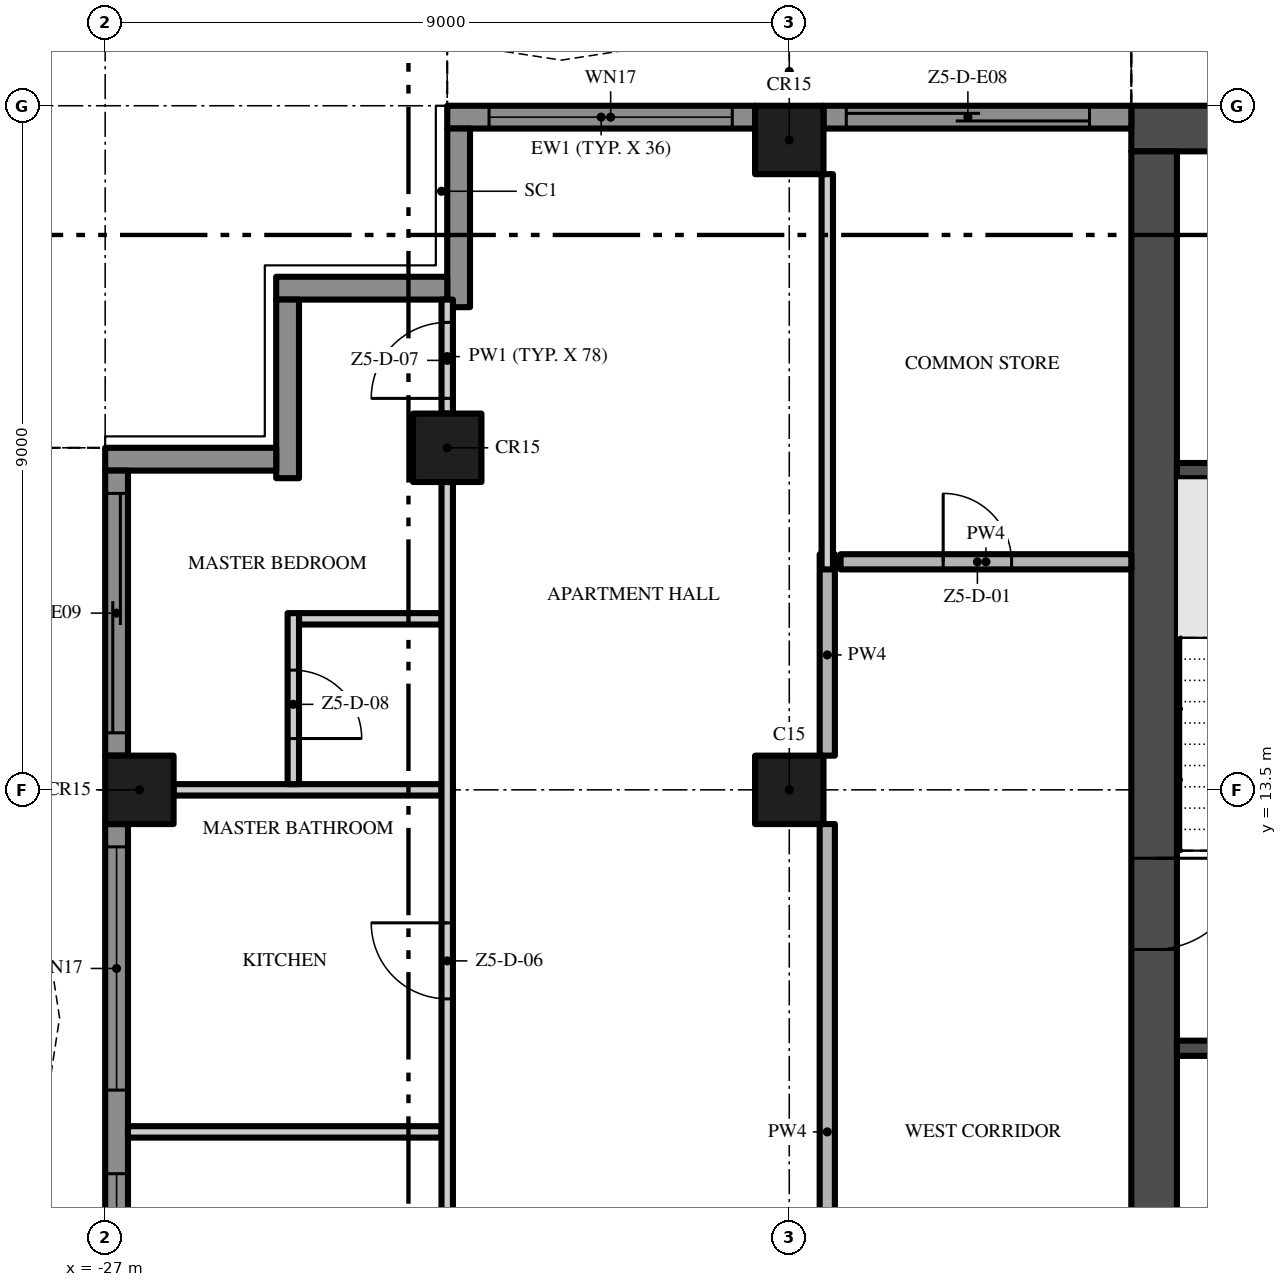
"""IFC4 building model, lengths in metres.
Left out: names, types, materials, properties, quantities, classifications, styles, units other than length and angle.
Written with IfcOpenShell. Run it as: python <this file> out.ifc"""

import sys

from ifc_helpers import new_model, si_unit, direction, frame, frame_2d, origin, origin_2d, place, context, subcontext, project, spatial, polyline, rectangle, outline, extrude, element, fill, save


model = new_model("IFC4")
c1 = context("Model", 3, precision=1e-05, world=origin(), true_north=direction((0.0, 1.0)))
c2 = subcontext(c1, "Body", "Model", "MODEL_VIEW")
j1 = project(units=[si_unit("LENGTHUNIT", "METRE"), si_unit("PLANEANGLEUNIT", "RADIAN")], contexts=[c1])
p1 = place(None, origin())
s1 = spatial("IfcSite", under=j1, at=p1, CompositionType="ELEMENT")
p2 = place(p1, origin())
s2 = spatial("IfcBuilding", under=s1, at=p2, CompositionType="ELEMENT")
p3 = place(p2, frame((0.0, 0.0, 280.6)))
s3 = spatial("IfcBuildingStorey", under=s2, at=p3, CompositionType="ELEMENT", Elevation=280.6)
p4 = place(p3, frame((13.5, 22.2, -0.3), z_axis=(0.0, 0.0, 1.0), x_axis=(-1.0, 0.0, 0.0)))
e1 = element("IfcWall", 1, at=p4, inside=s3, PredefinedType="SHEAR", context=c2, shape_type="SweptSolid", body=[
    extrude(rectangle(XDim=27.0, YDim=0.6, at=frame_2d((13.5, 0.0))), origin(), (0.0, 0.0, 1.0), 3.8),
])
p5 = place(p3, frame((-13.2, 21.9, -0.3), z_axis=(0.0, 0.0, 1.0), x_axis=(0.0, -1.0, 0.0)))
e2 = element("IfcWall", 2, at=p5, inside=s3, PredefinedType="SHEAR", context=c2, shape_type="SweptSolid", body=[
    extrude(rectangle(XDim=16.8, YDim=0.6, at=frame_2d((8.4, 0.0))), origin(), (0.0, 0.0, 1.0), 3.8),
])
p6 = place(p5, frame((9.3, 0.0, 0.3)))
e3 = element("IfcOpeningElement", 3, at=p6, cuts=e2, PredefinedType="OPENING", context=c2, shape_type="SweptSolid", body=[
    extrude(rectangle(XDim=1.2, YDim=2.2, at=frame_2d((0.6, 1.1))), frame((0.0, 0.31, 0.0), z_axis=(0.0, -1.0, 0.0), x_axis=(1.0, 0.0, 0.0)), (0.0, 0.0, 1.0), 0.62),
])
for number, where, z_axis, x_axis in (
    (4, (-18.0, 13.5, 0.0), (0.0, 0.0, 1.0), (1.0, 0.0, 0.0)),
    (5, (-18.0, 22.05, 0.0), (0.0, 0.0, 1.0), (1.0, 0.0, 0.0)),
    (6, (-26.55, 13.5, 0.0), (0.0, 0.0, 1.0), (1.0, 0.0, 0.0)),
    (7, (-22.5, 18.0, 0.0), (0.0, 0.0, 1.0), (1.0, 0.0, 0.0)),
):
    element("IfcColumn", number, at=place(p3, frame(where, z_axis=z_axis, x_axis=x_axis)), inside=s3, PredefinedType="COLUMN", context=c2, shape_type="SweptSolid", body=[
        extrude(rectangle(XDim=0.9, YDim=0.9, at=origin_2d()), origin(), (0.0, 0.0, 1.0), 3.5),
    ])
p7 = place(p3, frame((-17.55, 22.35, 0.0), z_axis=(0.0, 0.0, 1.0), x_axis=(1.0, 0.0, 0.0)))
e8 = element("IfcWall", 8, at=p7, inside=s3, PredefinedType="SOLIDWALL", context=c2, shape_type="SweptSolid", body=[
    extrude(rectangle(XDim=4.05, YDim=0.3, at=frame_2d((2.025, 0.0))), origin(), (0.0, 0.0, 1.0), 3.5),
])
p8 = place(p7, frame((0.3, 0.0, 0.0)))
e9 = element("IfcOpeningElement", 9, at=p8, cuts=e8, PredefinedType="OPENING", context=c2, shape_type="SweptSolid", body=[
    extrude(rectangle(XDim=3.2, YDim=2.4, at=frame_2d((1.6, 1.2))), frame((0.0, 0.16, 0.0), z_axis=(0.0, -1.0, 0.0), x_axis=(1.0, 0.0, 0.0)), (0.0, 0.0, 1.0), 0.32),
])
p9 = place(p3, frame((-22.5, 22.35, 0.0), z_axis=(0.0, 0.0, 1.0), x_axis=(1.0, 0.0, 0.0)))
e10 = element("IfcWall", 10, at=p9, inside=s3, PredefinedType="SOLIDWALL", context=c2, shape_type="SweptSolid", body=[
    extrude(rectangle(XDim=4.05, YDim=0.3, at=frame_2d((2.025, 0.0))), origin(), (0.0, 0.0, 1.0), 3.5),
])
p10 = place(p9, frame((0.55, 0.0, 0.45)))
e11 = element("IfcOpeningElement", 11, at=p10, cuts=e10, PredefinedType="OPENING", context=c2, shape_type="SweptSolid", body=[
    extrude(rectangle(XDim=3.2, YDim=2.65, at=frame_2d((1.6, 1.325))), frame((0.0, 0.16, 0.0), z_axis=(0.0, -1.0, 0.0), x_axis=(1.0, 0.0, 0.0)), (0.0, 0.0, 1.0), 0.32),
])
p11 = place(p3, frame((-22.35, 19.85, 0.0), z_axis=(0.0, 0.0, 1.0), x_axis=(0.0, 1.0, 0.0)))
e12 = element("IfcWall", 12, at=p11, inside=s3, PredefinedType="SOLIDWALL", context=c2, shape_type="SweptSolid", body=[
    extrude(rectangle(XDim=2.35, YDim=0.3, at=frame_2d((1.175, 0.0))), origin(), (0.0, 0.0, 1.0), 3.5),
])
p12 = place(p3, frame((-24.75, 20.1, 0.0), z_axis=(0.0, 0.0, 1.0), x_axis=(1.0, 0.0, 0.0)))
e13 = element("IfcWall", 13, at=p12, inside=s3, PredefinedType="SOLIDWALL", context=c2, shape_type="SweptSolid", body=[
    extrude(rectangle(XDim=2.25, YDim=0.3, at=frame_2d((1.125, 0.0))), origin(), (0.0, 0.0, 1.0), 3.5),
])
p13 = place(p3, frame((-24.6, 17.6, 0.0), z_axis=(0.0, 0.0, 1.0), x_axis=(0.0, 1.0, 0.0)))
e14 = element("IfcWall", 14, at=p13, inside=s3, PredefinedType="SOLIDWALL", context=c2, shape_type="SweptSolid", body=[
    extrude(rectangle(XDim=2.35, YDim=0.3, at=frame_2d((1.175, 0.0))), origin(), (0.0, 0.0, 1.0), 3.5),
])
p14 = place(p3, frame((-27.0, 17.85, 0.0), z_axis=(0.0, 0.0, 1.0), x_axis=(1.0, 0.0, 0.0)))
e15 = element("IfcWall", 15, at=p14, inside=s3, PredefinedType="SOLIDWALL", context=c2, shape_type="SweptSolid", body=[
    extrude(rectangle(XDim=2.25, YDim=0.3, at=frame_2d((1.125, 0.0))), origin(), (0.0, 0.0, 1.0), 3.5),
])
p15 = place(p3, frame((-26.85, 13.95, 0.0), z_axis=(0.0, 0.0, 1.0), x_axis=(0.0, 1.0, 0.0)))
e16 = element("IfcWall", 16, at=p15, inside=s3, PredefinedType="SOLIDWALL", context=c2, shape_type="SweptSolid", body=[
    extrude(rectangle(XDim=3.75, YDim=0.3, at=frame_2d((1.875, 0.0))), origin(), (0.0, 0.0, 1.0), 3.5),
])
p16 = place(p15, frame((0.3, 0.0, 0.0)))
e17 = element("IfcOpeningElement", 17, at=p16, cuts=e16, PredefinedType="OPENING", context=c2, shape_type="SweptSolid", body=[
    extrude(rectangle(XDim=3.15, YDim=2.4, at=frame_2d((1.575, 1.2))), frame((0.0, 0.16, 0.0), z_axis=(0.0, -1.0, 0.0), x_axis=(1.0, 0.0, 0.0)), (0.0, 0.0, 1.0), 0.32),
])
p17 = place(p3, frame((-26.85, 4.95, 0.0), z_axis=(0.0, 0.0, 1.0), x_axis=(0.0, 1.0, 0.0)))
e18 = element("IfcWall", 18, at=p17, inside=s3, PredefinedType="SOLIDWALL", context=c2, shape_type="SweptSolid", body=[
    extrude(rectangle(XDim=8.1, YDim=0.3, at=frame_2d((4.05, 0.0))), origin(), (0.0, 0.0, 1.0), 3.5),
])
p18 = place(p17, frame((4.6, 0.0, 0.45)))
e19 = element("IfcOpeningElement", 19, at=p18, cuts=e18, PredefinedType="OPENING", context=c2, shape_type="SweptSolid", body=[
    extrude(rectangle(XDim=3.2, YDim=2.65, at=frame_2d((1.6, 1.325))), frame((0.0, 0.16, 0.0), z_axis=(0.0, -1.0, 0.0), x_axis=(1.0, 0.0, 0.0)), (0.0, 0.0, 1.0), 0.32),
])
p19 = place(p17, frame((0.3, 0.0, 0.45)))
e20 = element("IfcOpeningElement", 20, at=p19, cuts=e18, PredefinedType="OPENING", context=c2, shape_type="SweptSolid", body=[
    extrude(rectangle(XDim=3.2, YDim=2.65, at=frame_2d((1.6, 1.325))), frame((0.0, 0.16, 0.0), z_axis=(0.0, -1.0, 0.0), x_axis=(1.0, 0.0, 0.0)), (0.0, 0.0, 1.0), 0.32),
])
p20 = place(p3, origin())
e21 = element("IfcWall", 21, at=p20, inside=s3, PredefinedType="USERDEFINED", context=c2, shape_type="SweptSolid", body=[
    extrude(outline(polyline([(-13.5, 25.5), (-15.0, 25.271), (-16.5, 24.671), (-18.0, 23.929), (-19.5, 23.329), (-21.0, 23.1), (-22.5, 23.329), (-22.538, 23.082), (-21.0, 22.847), (-19.434, 23.086), (-17.898, 23.701), (-16.398, 24.442), (-14.934, 25.028), (-13.462, 25.253), (-13.5, 25.5)])), origin(), (0.0, 0.0, 1.0), 0.9),
])
p21 = place(p3, origin())
e22 = element("IfcWall", 22, at=p21, inside=s3, PredefinedType="USERDEFINED", context=c2, shape_type="SweptSolid", body=[
    extrude(outline(polyline([(-30.0, 18.0), (-29.771, 16.5), (-29.171, 15.0), (-28.429, 13.5), (-27.829, 12.0), (-27.6, 10.5), (-27.829, 9.0), (-28.429, 7.5), (-29.171, 6.0), (-29.771, 4.5), (-30.0, 3.0), (-29.771, 1.5), (-29.171, 0.0), (-28.429, -1.5), (-27.829, -3.0), (-27.6, -4.5), (-27.829, -6.0), (-28.429, -7.5), (-29.171, -9.0), (-29.771, -10.5), (-30.0, -12.0), (-29.771, -13.5), (-29.171, -15.0), (-28.429, -16.5), (-27.829, -18.0), (-27.597, -17.907), (-28.201, -16.398), (-28.942, -14.898), (-29.528, -13.434), (-29.747, -12.0), (-29.528, -10.566), (-28.942, -9.102), (-28.201, -7.602), (-27.586, -6.066), (-27.347, -4.5), (-27.586, -2.934), (-28.201, -1.398), (-28.942, 0.102), (-29.528, 1.566), (-29.747, 3.0), (-29.528, 4.434), (-28.942, 5.898), (-28.201, 7.398), (-27.586, 8.934), (-27.347, 10.5), (-27.586, 12.066), (-28.201, 13.602), (-28.942, 15.102), (-29.528, 16.566), (-29.753, 18.038), (-30.0, 18.0)])), origin(), (0.0, 0.0, 1.0), 0.9),
])
for number, where, z_axis, x_axis in (
    (23, (-12.9, 10.1, 0.0), (0.0, 0.0, 1.0), (1.0, 0.0, 0.0)),
    (24, (-12.9, 17.7, 0.0), (0.0, 0.0, 1.0), (1.0, 0.0, 0.0)),
):
    element("IfcWall", number, at=place(p3, frame(where, z_axis=z_axis, x_axis=x_axis)), inside=s3, PredefinedType="SHEAR", context=c2, shape_type="SweptSolid", body=[
        extrude(rectangle(XDim=3.25, YDim=0.2, at=frame_2d((1.625, 0.0))), origin(), (0.0, 0.0, 1.0), 3.5),
    ])
p22 = place(p3, frame((-26.7, 9.0, 0.0), z_axis=(0.0, 0.0, 1.0), x_axis=(1.0, 0.0, 0.0)))
e25 = element("IfcWall", 25, at=p22, inside=s3, PredefinedType="PARTITIONING", context=c2, shape_type="SweptSolid", body=[
    extrude(rectangle(XDim=4.125, YDim=0.15, at=frame_2d((2.062, 0.0))), origin(), (0.0, 0.0, 1.0), 3.5),
])
p23 = place(p3, frame((-26.1, 13.5, 0.0), z_axis=(0.0, 0.0, 1.0), x_axis=(1.0, 0.0, 0.0)))
e26 = element("IfcWall", 26, at=p23, inside=s3, PredefinedType="PARTITIONING", context=c2, shape_type="SweptSolid", body=[
    extrude(rectangle(XDim=3.525, YDim=0.15, at=frame_2d((1.762, 0.0))), origin(), (0.0, 0.0, 1.0), 3.5),
])
p24 = place(p3, frame((-24.45, 15.75, 0.0), z_axis=(0.0, 0.0, 1.0), x_axis=(1.0, 0.0, 0.0)))
e27 = element("IfcWall", 27, at=p24, inside=s3, PredefinedType="PARTITIONING", context=c2, shape_type="SweptSolid", body=[
    extrude(rectangle(XDim=1.875, YDim=0.15, at=frame_2d((0.938, 0.0))), origin(), (0.0, 0.0, 1.0), 3.5),
])
p25 = place(p3, frame((-17.325, 16.5, 0.0), z_axis=(0.0, 0.0, 1.0), x_axis=(1.0, 0.0, 0.0)))
e28 = element("IfcWall", 28, at=p25, inside=s3, PredefinedType="PARTITIONING", context=c2, shape_type="SweptSolid", body=[
    extrude(rectangle(XDim=3.825, YDim=0.2, at=frame_2d((1.913, 0.0))), origin(), (0.0, 0.0, 1.0), 3.5),
])
p26 = place(p25, frame((1.35, 0.0, 0.0)))
e29 = element("IfcOpeningElement", 29, at=p26, cuts=e28, PredefinedType="OPENING", context=c2, shape_type="SweptSolid", body=[
    extrude(rectangle(XDim=0.9, YDim=2.1, at=frame_2d((0.45, 1.05))), frame((0.0, 0.11, 0.0), z_axis=(0.0, -1.0, 0.0), x_axis=(1.0, 0.0, 0.0)), (0.0, 0.0, 1.0), 0.22),
])
p27 = place(p3, frame((-24.525, 15.825, 0.0), z_axis=(0.0, 0.0, 1.0), x_axis=(0.0, -1.0, 0.0)))
e30 = element("IfcWall", 30, at=p27, inside=s3, PredefinedType="PARTITIONING", context=c2, shape_type="SweptSolid", body=[
    extrude(rectangle(XDim=2.25, YDim=0.15, at=frame_2d((1.125, 0.0))), origin(), (0.0, 0.0, 1.0), 3.5),
])
p28 = place(p27, frame((0.75, 0.0, 0.0)))
e31 = element("IfcOpeningElement", 31, at=p28, cuts=e30, PredefinedType="OPENING", context=c2, shape_type="SweptSolid", body=[
    extrude(rectangle(XDim=0.9, YDim=2.1, at=frame_2d((0.45, 1.05))), frame((0.0, 0.085, 0.0), z_axis=(0.0, -1.0, 0.0), x_axis=(1.0, 0.0, 0.0)), (0.0, 0.0, 1.0), 0.17),
])
p29 = place(p3, frame((-22.5, 0.1, 0.0), z_axis=(0.0, 0.0, 1.0), x_axis=(0.0, 1.0, 0.0)))
e32 = element("IfcWall", 32, at=p29, inside=s3, PredefinedType="PARTITIONING", context=c2, shape_type="SweptSolid", body=[
    extrude(rectangle(XDim=17.45, YDim=0.15, at=frame_2d((8.725, 0.0))), origin(), (0.0, 0.0, 1.0), 3.5),
])
p30 = place(p29, frame((2.4, 0.0, 0.0)))
e33 = element("IfcOpeningElement", 33, at=p30, cuts=e32, PredefinedType="OPENING", context=c2, shape_type="SweptSolid", body=[
    extrude(rectangle(XDim=1.8, YDim=2.4, at=frame_2d((0.9, 1.2))), frame((0.0, 0.085, 0.0), z_axis=(0.0, -1.0, 0.0), x_axis=(1.0, 0.0, 0.0)), (0.0, 0.0, 1.0), 0.17),
])
p31 = place(p29, frame((10.65, 0.0, 0.0)))
e34 = element("IfcOpeningElement", 34, at=p31, cuts=e32, PredefinedType="OPENING", context=c2, shape_type="SweptSolid", body=[
    extrude(rectangle(XDim=1.0, YDim=2.4, at=frame_2d((0.5, 1.2))), frame((0.0, 0.085, 0.0), z_axis=(0.0, -1.0, 0.0), x_axis=(1.0, 0.0, 0.0)), (0.0, 0.0, 1.0), 0.17),
])
p32 = place(p3, frame((-22.5, 18.45, 0.0), z_axis=(0.0, 0.0, 1.0), x_axis=(0.0, 1.0, 0.0)))
e35 = element("IfcWall", 35, at=p32, inside=s3, PredefinedType="PARTITIONING", context=c2, shape_type="SweptSolid", body=[
    extrude(rectangle(XDim=1.5, YDim=0.15, at=frame_2d((0.75, 0.0))), origin(), (0.0, 0.0, 1.0), 3.5),
])
p33 = place(p32, frame((0.2, 0.0, 0.0)))
e36 = element("IfcOpeningElement", 36, at=p33, cuts=e35, PredefinedType="OPENING", context=c2, shape_type="SweptSolid", body=[
    extrude(rectangle(XDim=1.0, YDim=2.4, at=frame_2d((0.5, 1.2))), frame((0.0, 0.085, 0.0), z_axis=(0.0, -1.0, 0.0), x_axis=(1.0, 0.0, 0.0)), (0.0, 0.0, 1.0), 0.17),
])
p34 = place(p3, frame((-17.5, 4.95, 0.0), z_axis=(0.0, 0.0, 1.0), x_axis=(0.0, 1.0, 0.0)))
e37 = element("IfcWall", 37, at=p34, inside=s3, PredefinedType="PARTITIONING", context=c2, shape_type="SweptSolid", body=[
    extrude(rectangle(XDim=8.1, YDim=0.2, at=frame_2d((4.05, 0.0))), origin(), (0.0, 0.0, 1.0), 3.5),
])
p35 = place(p34, frame((1.2, 0.0, 0.0)))
e38 = element("IfcOpeningElement", 38, at=p35, cuts=e37, PredefinedType="OPENING", context=c2, shape_type="SweptSolid", body=[
    extrude(rectangle(XDim=1.2, YDim=2.4, at=frame_2d((0.6, 1.2))), frame((0.0, 0.11, 0.0), z_axis=(0.0, -1.0, 0.0), x_axis=(1.0, 0.0, 0.0)), (0.0, 0.0, 1.0), 0.22),
])
p36 = place(p3, frame((-17.5, 13.95, 0.0), z_axis=(0.0, 0.0, 1.0), x_axis=(0.0, 1.0, 0.0)))
e39 = element("IfcWall", 39, at=p36, inside=s3, PredefinedType="PARTITIONING", context=c2, shape_type="SweptSolid", body=[
    extrude(rectangle(XDim=2.65, YDim=0.2, at=frame_2d((1.325, 0.0))), origin(), (0.0, 0.0, 1.0), 3.5),
])
p37 = place(p3, frame((-17.5, 16.4, 0.0), z_axis=(0.0, 0.0, 1.0), x_axis=(0.0, 1.0, 0.0)))
e40 = element("IfcWall", 40, at=p37, inside=s3, PredefinedType="PARTITIONING", context=c2, shape_type="SweptSolid", body=[
    extrude(rectangle(XDim=5.2, YDim=0.15, at=frame_2d((2.6, 0.0))), origin(), (0.0, 0.0, 1.0), 3.5),
])
p38 = place(p8, origin())
e41 = element("IfcDoor", 41, at=p38, inside=s3, OperationType="SINGLE_SWING_LEFT", PredefinedType="DOOR", context=c2, shape_type="SweptSolid", body=[
    extrude(rectangle(XDim=3.2, YDim=2.4, at=frame_2d((1.6, 1.2))), frame((0.0, 0.025, 0.0), z_axis=(0.0, -1.0, 0.0), x_axis=(1.0, 0.0, 0.0)), (0.0, 0.0, 1.0), 0.05),
])
fill(e9, e41)
p39 = place(p10, origin())
e42 = element("IfcWindow", 42, at=p39, inside=s3, PartitioningType="SINGLE_PANEL", PredefinedType="WINDOW", context=c2, shape_type="SweptSolid", body=[
    extrude(rectangle(XDim=3.2, YDim=2.65, at=frame_2d((1.6, 1.325))), frame((0.0, 0.03, 0.0), z_axis=(0.0, -1.0, 0.0), x_axis=(1.0, 0.0, 0.0)), (0.0, 0.0, 1.0), 0.06),
])
fill(e11, e42)
p40 = place(p16, origin())
e43 = element("IfcDoor", 43, at=p40, inside=s3, OperationType="SINGLE_SWING_LEFT", PredefinedType="DOOR", context=c2, shape_type="SweptSolid", body=[
    extrude(rectangle(XDim=3.15, YDim=2.4, at=frame_2d((1.575, 1.2))), frame((0.0, 0.025, 0.0), z_axis=(0.0, -1.0, 0.0), x_axis=(1.0, 0.0, 0.0)), (0.0, 0.0, 1.0), 0.05),
])
fill(e17, e43)
p41 = place(p18, origin())
e44 = element("IfcWindow", 44, at=p41, inside=s3, PartitioningType="SINGLE_PANEL", PredefinedType="WINDOW", context=c2, shape_type="SweptSolid", body=[
    extrude(rectangle(XDim=3.2, YDim=2.65, at=frame_2d((1.6, 1.325))), frame((0.0, 0.03, 0.0), z_axis=(0.0, -1.0, 0.0), x_axis=(1.0, 0.0, 0.0)), (0.0, 0.0, 1.0), 0.06),
])
fill(e19, e44)
p42 = place(p19, origin())
e45 = element("IfcWindow", 45, at=p42, inside=s3, PartitioningType="SINGLE_PANEL", PredefinedType="WINDOW", context=c2, shape_type="SweptSolid", body=[
    extrude(rectangle(XDim=3.2, YDim=2.65, at=frame_2d((1.6, 1.325))), frame((0.0, 0.03, 0.0), z_axis=(0.0, -1.0, 0.0), x_axis=(1.0, 0.0, 0.0)), (0.0, 0.0, 1.0), 0.06),
])
fill(e20, e45)
p43 = place(p6, frame((1.2, 0.0, 0.0), z_axis=(0.0, 0.0, 1.0), x_axis=(-1.0, 0.0, 0.0)))
e46 = element("IfcDoor", 46, at=p43, inside=s3, OperationType="SINGLE_SWING_RIGHT", PredefinedType="DOOR", context=c2, shape_type="SweptSolid", body=[
    extrude(rectangle(XDim=1.2, YDim=2.2, at=frame_2d((0.6, 1.1))), frame((0.0, 0.025, 0.0), z_axis=(0.0, -1.0, 0.0), x_axis=(1.0, 0.0, 0.0)), (0.0, 0.0, 1.0), 0.05),
])
fill(e3, e46)
p44 = place(p26, origin())
e47 = element("IfcDoor", 47, at=p44, inside=s3, OperationType="SINGLE_SWING_LEFT", PredefinedType="DOOR", context=c2, shape_type="SweptSolid", body=[
    extrude(rectangle(XDim=0.9, YDim=2.1, at=frame_2d((0.45, 1.05))), frame((0.0, 0.025, 0.0), z_axis=(0.0, -1.0, 0.0), x_axis=(1.0, 0.0, 0.0)), (0.0, 0.0, 1.0), 0.05),
])
fill(e29, e47)
p45 = place(p31, origin())
e48 = element("IfcDoor", 48, at=p45, inside=s3, OperationType="SINGLE_SWING_RIGHT", PredefinedType="DOOR", context=c2, shape_type="SweptSolid", body=[
    extrude(rectangle(XDim=1.0, YDim=2.4, at=frame_2d((0.5, 1.2))), frame((0.0, 0.025, 0.0), z_axis=(0.0, -1.0, 0.0), x_axis=(1.0, 0.0, 0.0)), (0.0, 0.0, 1.0), 0.05),
])
fill(e34, e48)
p46 = place(p33, origin())
e49 = element("IfcDoor", 49, at=p46, inside=s3, OperationType="SINGLE_SWING_LEFT", PredefinedType="DOOR", context=c2, shape_type="SweptSolid", body=[
    extrude(rectangle(XDim=1.0, YDim=2.4, at=frame_2d((0.5, 1.2))), frame((0.0, 0.025, 0.0), z_axis=(0.0, -1.0, 0.0), x_axis=(1.0, 0.0, 0.0)), (0.0, 0.0, 1.0), 0.05),
])
fill(e36, e49)
p47 = place(p28, origin())
e50 = element("IfcDoor", 50, at=p47, inside=s3, OperationType="SINGLE_SWING_RIGHT", PredefinedType="DOOR", context=c2, shape_type="SweptSolid", body=[
    extrude(rectangle(XDim=0.9, YDim=2.1, at=frame_2d((0.45, 1.05))), frame((0.0, 0.025, 0.0), z_axis=(0.0, -1.0, 0.0), x_axis=(1.0, 0.0, 0.0)), (0.0, 0.0, 1.0), 0.05),
])
fill(e31, e50)
save(model, sys.argv[1])
